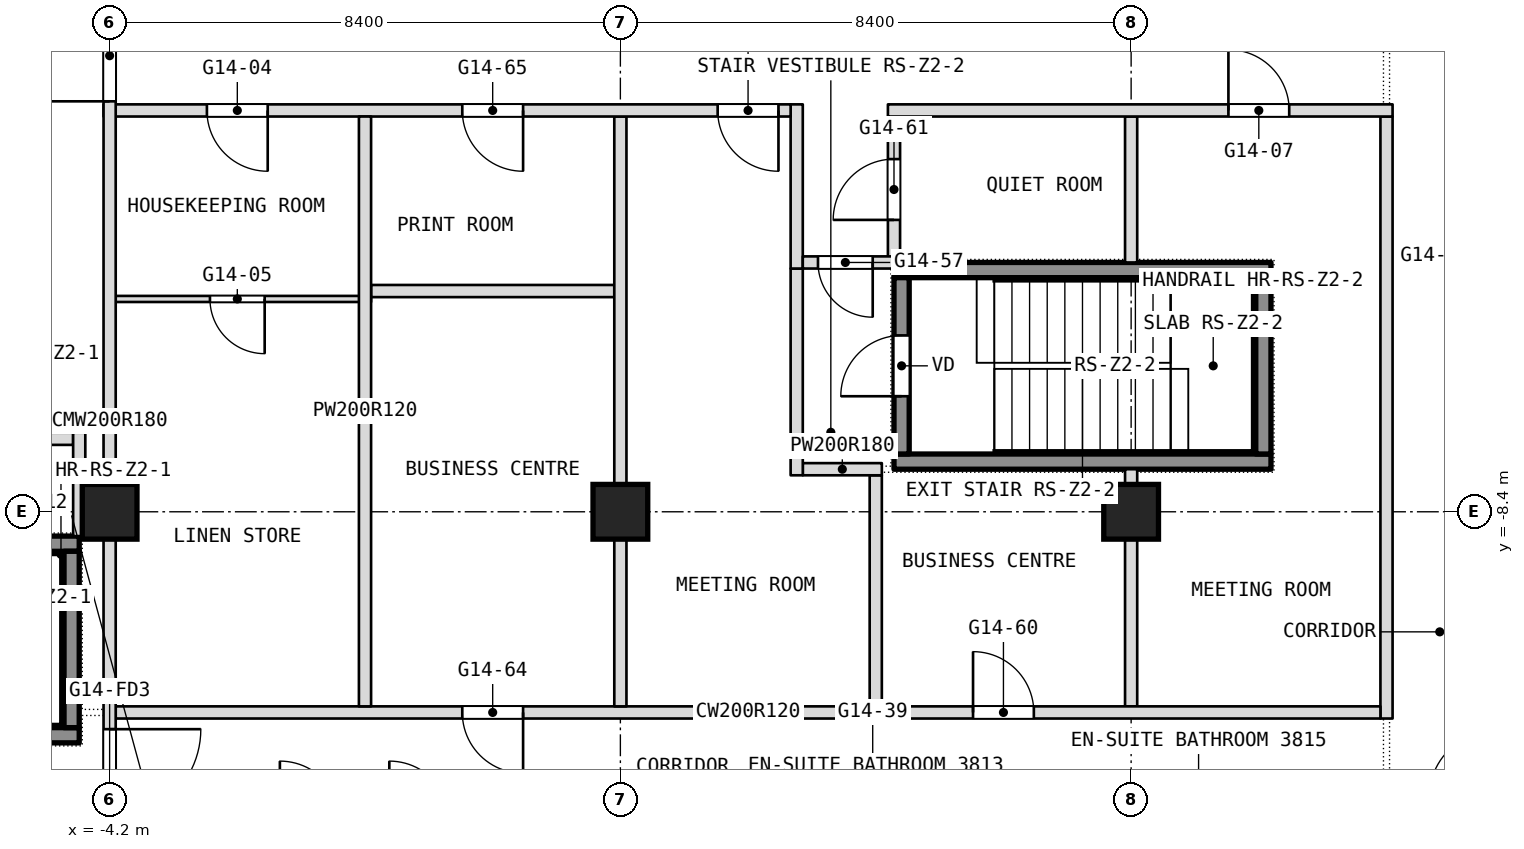
"""IFC4 building model, lengths in metres.
Left out: names, types, materials, properties, quantities, classifications, styles, units other than length and angle.
Written with IfcOpenShell. Run it as: python <this file> out.ifc"""

import sys

from ifc_helpers import new_model, si_unit, direction, frame, frame_2d, origin, origin_2d, place, context, subcontext, project, spatial, rectangle, extrude, element, fill, save


model = new_model("IFC4")
c1 = context("Model", 3, precision=1e-05, world=origin(), true_north=direction((0.0, 1.0)))
c2 = subcontext(c1, "Body", "Model", "MODEL_VIEW")
j1 = project(units=[si_unit("LENGTHUNIT", "METRE"), si_unit("PLANEANGLEUNIT", "RADIAN")], contexts=[c1])
p1 = place(None, origin())
s1 = spatial("IfcSite", under=j1, at=p1, CompositionType="ELEMENT")
p2 = place(p1, origin())
s2 = spatial("IfcBuilding", under=s1, at=p2, CompositionType="ELEMENT")
p3 = place(p2, frame((0.0, 0.0, 162.5)))
s3 = spatial("IfcBuildingStorey", under=s2, at=p3, CompositionType="ELEMENT", Elevation=162.5)
for number, where, z_axis, x_axis in (
    (1, (-4.2, -8.4, 0.0), (0.0, 0.0, 1.0), (1.0, 0.0, 0.0)),
    (2, (4.2, -8.4, 0.0), (0.0, 0.0, 1.0), (1.0, 0.0, 0.0)),
    (3, (12.6, -8.4, 0.0), (0.0, 0.0, 1.0), (1.0, 0.0, 0.0)),
):
    element("IfcColumn", number, at=place(p3, frame(where, z_axis=z_axis, x_axis=x_axis)), inside=s3, PredefinedType="COLUMN", context=c2, shape_type="SweptSolid", body=[
        extrude(rectangle(XDim=0.9, YDim=0.9, at=origin_2d()), origin(), (0.0, 0.0, 1.0), 3.6),
    ])
p4 = place(p3, frame((16.8, -11.8, 0.0), z_axis=(0.0, 0.0, 1.0), x_axis=(0.0, 1.0, 0.0)))
e4 = element("IfcWall", 4, at=p4, inside=s3, PredefinedType="PARTITIONING", context=c2, shape_type="SweptSolid", body=[
    extrude(rectangle(XDim=9.9, YDim=0.2, at=frame_2d((4.95, 0.0))), origin(), (0.0, 0.0, 1.0), 3.34),
])
p5 = place(p3, frame((12.6, -11.6, 0.0), z_axis=(0.0, 0.0, 1.0), x_axis=(0.0, 1.0, 0.0)))
e5 = element("IfcWall", 5, at=p5, inside=s3, PredefinedType="PARTITIONING", context=c2, shape_type="SweptSolid", body=[
    extrude(rectangle(XDim=3.9, YDim=0.2, at=frame_2d((1.95, 0.0))), origin(), (0.0, 0.0, 1.0), 3.34),
])
p6 = place(p3, frame((12.6, -4.3, 0.0), z_axis=(0.0, 0.0, 1.0), x_axis=(0.0, 1.0, 0.0)))
e6 = element("IfcWall", 6, at=p6, inside=s3, PredefinedType="PARTITIONING", context=c2, shape_type="SweptSolid", body=[
    extrude(rectangle(XDim=2.4, YDim=0.2, at=frame_2d((1.2, 0.0))), origin(), (0.0, 0.0, 1.0), 3.34),
])
p7 = place(p3, frame((-4.1, -11.7, 0.0), z_axis=(0.0, 0.0, 1.0), x_axis=(1.0, 0.0, 0.0)))
e7 = element("IfcWall", 7, at=p7, inside=s3, PredefinedType="PARTITIONING", context=c2, shape_type="SweptSolid", body=[
    extrude(rectangle(XDim=20.8, YDim=0.2, at=frame_2d((10.4, 0.0))), origin(), (0.0, 0.0, 1.0), 3.34),
])
p8 = place(p7, frame((14.1, 0.0, 0.0)))
e8 = element("IfcOpeningElement", 8, at=p8, cuts=e7, PredefinedType="OPENING", context=c2, shape_type="SweptSolid", body=[
    extrude(rectangle(XDim=1.0, YDim=2.1, at=frame_2d((0.5, 1.05))), frame((0.0, 0.1, 0.0), z_axis=(0.0, -1.0, 0.0), x_axis=(1.0, 0.0, 0.0)), (0.0, 0.0, 1.0), 0.2),
])
p9 = place(p7, frame((5.7, 0.0, 0.0)))
e9 = element("IfcOpeningElement", 9, at=p9, cuts=e7, PredefinedType="OPENING", context=c2, shape_type="SweptSolid", body=[
    extrude(rectangle(XDim=1.0, YDim=2.1, at=frame_2d((0.5, 1.05))), frame((0.0, 0.1, 0.0), z_axis=(0.0, -1.0, 0.0), x_axis=(1.0, 0.0, 0.0)), (0.0, 0.0, 1.0), 0.2),
])
p10 = place(p3, frame((8.7, -4.3, 0.0), z_axis=(0.0, 0.0, 1.0), x_axis=(0.0, 1.0, 0.0)))
e10 = element("IfcWall", 10, at=p10, inside=s3, PredefinedType="PARTITIONING", context=c2, shape_type="SweptSolid", body=[
    extrude(rectangle(XDim=2.4, YDim=0.2, at=frame_2d((1.2, 0.0))), origin(), (0.0, 0.0, 1.0), 3.34),
])
p11 = place(p10, frame((0.7, 0.0, 0.0)))
e11 = element("IfcOpeningElement", 11, at=p11, cuts=e10, PredefinedType="OPENING", context=c2, shape_type="SweptSolid", body=[
    extrude(rectangle(XDim=1.0, YDim=2.1, at=frame_2d((0.5, 1.05))), frame((0.0, 0.1, 0.0), z_axis=(0.0, -1.0, 0.0), x_axis=(1.0, 0.0, 0.0)), (0.0, 0.0, 1.0), 0.2),
])
p12 = place(p3, frame((8.4, -11.6, 0.0), z_axis=(0.0, 0.0, 1.0), x_axis=(0.0, 1.0, 0.0)))
e12 = element("IfcWall", 12, at=p12, inside=s3, PredefinedType="PARTITIONING", context=c2, shape_type="SweptSolid", body=[
    extrude(rectangle(XDim=3.8, YDim=0.2, at=frame_2d((1.9, 0.0))), origin(), (0.0, 0.0, 1.0), 3.34),
])
p13 = place(p3, frame((7.2, -7.7, 0.0), z_axis=(0.0, 0.0, 1.0), x_axis=(1.0, 0.0, 0.0)))
e13 = element("IfcWall", 13, at=p13, inside=s3, PredefinedType="PARTITIONING", context=c2, shape_type="SweptSolid", body=[
    extrude(rectangle(XDim=1.3, YDim=0.2, at=frame_2d((0.65, 0.0))), origin(), (0.0, 0.0, 1.0), 3.34),
])
p14 = place(p3, frame((-8.5, -7.2, 0.0), z_axis=(0.0, 0.0, 1.0), x_axis=(1.0, 0.0, 0.0)))
e14 = element("IfcWall", 14, at=p14, inside=s3, PredefinedType="PARTITIONING", context=c2, shape_type="SweptSolid", body=[
    extrude(rectangle(XDim=3.7, YDim=0.2, at=frame_2d((1.85, 0.0))), origin(), (0.0, 0.0, 1.0), 3.34),
])
p15 = place(p14, frame((0.25, 0.0, 0.0)))
e15 = element("IfcOpeningElement", 15, at=p15, cuts=e14, PredefinedType="OPENING", context=c2, shape_type="SweptSolid", body=[
    extrude(rectangle(XDim=0.9, YDim=2.1, at=frame_2d((0.45, 1.05))), frame((0.0, 0.1, 0.0), z_axis=(0.0, -1.0, 0.0), x_axis=(1.0, 0.0, 0.0)), (0.0, 0.0, 1.0), 0.2),
])
p16 = place(p3, frame((7.1, -7.8, 0.0), z_axis=(0.0, 0.0, 1.0), x_axis=(0.0, 1.0, 0.0)))
e16 = element("IfcWall", 16, at=p16, inside=s3, PredefinedType="PARTITIONING", context=c2, shape_type="SweptSolid", body=[
    extrude(rectangle(XDim=3.4, YDim=0.2, at=frame_2d((1.7, 0.0))), origin(), (0.0, 0.0, 1.0), 3.34),
])
p17 = place(p3, frame((7.1, -4.4, 0.0), z_axis=(0.0, 0.0, 1.0), x_axis=(0.0, 1.0, 0.0)))
e17 = element("IfcWall", 17, at=p17, inside=s3, PredefinedType="PARTITIONING", context=c2, shape_type="SweptSolid", body=[
    extrude(rectangle(XDim=2.7, YDim=0.2, at=frame_2d((1.35, 0.0))), origin(), (0.0, 0.0, 1.0), 3.34),
])
p18 = place(p3, frame((-4.1, -4.9, 0.0), z_axis=(0.0, 0.0, 1.0), x_axis=(1.0, 0.0, 0.0)))
e18 = element("IfcWall", 18, at=p18, inside=s3, PredefinedType="PARTITIONING", context=c2, shape_type="SweptSolid", body=[
    extrude(rectangle(XDim=4.2, YDim=0.1, at=frame_2d((2.1, 0.0))), origin(), (0.0, 0.0, 1.0), 3.34),
])
p19 = place(p18, frame((1.55, 0.0, 0.0)))
e19 = element("IfcOpeningElement", 19, at=p19, cuts=e18, PredefinedType="OPENING", context=c2, shape_type="SweptSolid", body=[
    extrude(rectangle(XDim=0.9, YDim=2.1, at=frame_2d((0.45, 1.05))), frame((0.0, 0.05, 0.0), z_axis=(0.0, -1.0, 0.0), x_axis=(1.0, 0.0, 0.0)), (0.0, 0.0, 1.0), 0.1),
])
p20 = place(p3, frame((0.1, -4.77, 0.0), z_axis=(0.0, 0.0, 1.0), x_axis=(1.0, 0.0, 0.0)))
e20 = element("IfcWall", 20, at=p20, inside=s3, PredefinedType="PARTITIONING", context=c2, shape_type="SweptSolid", body=[
    extrude(rectangle(XDim=4.0, YDim=0.2, at=frame_2d((2.0, 0.0))), origin(), (0.0, 0.0, 1.0), 3.34),
])
p21 = place(p3, frame((7.2, -4.3, 0.0), z_axis=(0.0, 0.0, 1.0), x_axis=(1.0, 0.0, 0.0)))
e21 = element("IfcWall", 21, at=p21, inside=s3, PredefinedType="PARTITIONING", context=c2, shape_type="SweptSolid", body=[
    extrude(rectangle(XDim=1.5, YDim=0.2, at=frame_2d((0.75, 0.0))), origin(), (0.0, 0.0, 1.0), 3.34),
])
p22 = place(p21, frame((0.25, 0.0, 0.0)))
e22 = element("IfcOpeningElement", 22, at=p22, cuts=e21, PredefinedType="OPENING", context=c2, shape_type="SweptSolid", body=[
    extrude(rectangle(XDim=0.9, YDim=2.1, at=frame_2d((0.45, 1.05))), frame((0.0, 0.1, 0.0), z_axis=(0.0, -1.0, 0.0), x_axis=(1.0, 0.0, 0.0)), (0.0, 0.0, 1.0), 0.2),
])
p23 = place(p3, frame((4.2, -11.6, 0.0), z_axis=(0.0, 0.0, 1.0), x_axis=(0.0, 1.0, 0.0)))
e23 = element("IfcWall", 23, at=p23, inside=s3, PredefinedType="PARTITIONING", context=c2, shape_type="SweptSolid", body=[
    extrude(rectangle(XDim=9.7, YDim=0.2, at=frame_2d((4.85, 0.0))), origin(), (0.0, 0.0, 1.0), 3.34),
])
p24 = place(p3, frame((-4.3, -1.8, 0.0), z_axis=(0.0, 0.0, 1.0), x_axis=(1.0, 0.0, 0.0)))
e24 = element("IfcWall", 24, at=p24, inside=s3, PredefinedType="PARTITIONING", context=c2, shape_type="SweptSolid", body=[
    extrude(rectangle(XDim=11.3, YDim=0.2, at=frame_2d((5.65, 0.0))), origin(), (0.0, 0.0, 1.0), 3.34),
])
p25 = place(p24, frame((1.7, 0.0, 0.0)))
e25 = element("IfcOpeningElement", 25, at=p25, cuts=e24, PredefinedType="OPENING", context=c2, shape_type="SweptSolid", body=[
    extrude(rectangle(XDim=1.0, YDim=2.1, at=frame_2d((0.5, 1.05))), frame((0.0, 0.1, 0.0), z_axis=(0.0, -1.0, 0.0), x_axis=(1.0, 0.0, 0.0)), (0.0, 0.0, 1.0), 0.2),
])
p26 = place(p24, frame((10.1, 0.0, 0.0)))
e26 = element("IfcOpeningElement", 26, at=p26, cuts=e24, PredefinedType="OPENING", context=c2, shape_type="SweptSolid", body=[
    extrude(rectangle(XDim=1.0, YDim=2.1, at=frame_2d((0.5, 1.05))), frame((0.0, 0.1, 0.0), z_axis=(0.0, -1.0, 0.0), x_axis=(1.0, 0.0, 0.0)), (0.0, 0.0, 1.0), 0.2),
])
p27 = place(p24, frame((5.9, 0.0, 0.0)))
e27 = element("IfcOpeningElement", 27, at=p27, cuts=e24, PredefinedType="OPENING", context=c2, shape_type="SweptSolid", body=[
    extrude(rectangle(XDim=1.0, YDim=2.1, at=frame_2d((0.5, 1.05))), frame((0.0, 0.1, 0.0), z_axis=(0.0, -1.0, 0.0), x_axis=(1.0, 0.0, 0.0)), (0.0, 0.0, 1.0), 0.2),
])
p28 = place(p3, frame((8.6, -1.8, 0.0), z_axis=(0.0, 0.0, 1.0), x_axis=(1.0, 0.0, 0.0)))
e28 = element("IfcWall", 28, at=p28, inside=s3, PredefinedType="PARTITIONING", context=c2, shape_type="SweptSolid", body=[
    extrude(rectangle(XDim=8.3, YDim=0.2, at=frame_2d((4.15, 0.0))), origin(), (0.0, 0.0, 1.0), 3.34),
])
p29 = place(p28, frame((5.6, 0.0, 0.0)))
e29 = element("IfcOpeningElement", 29, at=p29, cuts=e28, PredefinedType="OPENING", context=c2, shape_type="SweptSolid", body=[
    extrude(rectangle(XDim=1.0, YDim=2.1, at=frame_2d((0.5, 1.05))), frame((0.0, 0.1, 0.0), z_axis=(0.0, -1.0, 0.0), x_axis=(1.0, 0.0, 0.0)), (0.0, 0.0, 1.0), 0.2),
])
p30 = place(p3, frame((0.0, -11.6, 0.0), z_axis=(0.0, 0.0, 1.0), x_axis=(0.0, 1.0, 0.0)))
e30 = element("IfcWall", 30, at=p30, inside=s3, PredefinedType="PARTITIONING", context=c2, shape_type="SweptSolid", body=[
    extrude(rectangle(XDim=9.7, YDim=0.2, at=frame_2d((4.85, 0.0))), origin(), (0.0, 0.0, 1.0), 3.34),
])
p31 = place(p3, frame((-4.2, -13.8, 0.0), z_axis=(0.0, 0.0, 1.0), x_axis=(0.0, 1.0, 0.0)))
e31 = element("IfcWall", 31, at=p31, inside=s3, PredefinedType="PARTITIONING", context=c2, shape_type="SweptSolid", body=[
    extrude(rectangle(XDim=13.8, YDim=0.2, at=frame_2d((6.9, 0.0))), origin(), (0.0, 0.0, 1.0), 3.34),
])
p32 = place(p31, frame((12.15, 0.0, 0.0)))
e32 = element("IfcOpeningElement", 32, at=p32, cuts=e31, PredefinedType="OPENING", context=c2, shape_type="SweptSolid", body=[
    extrude(rectangle(XDim=1.5, YDim=2.1, at=frame_2d((0.75, 1.05))), frame((0.0, 0.1, 0.0), z_axis=(0.0, -1.0, 0.0), x_axis=(1.0, 0.0, 0.0)), (0.0, 0.0, 1.0), 0.2),
])
p33 = place(p31, frame((0.325, 0.0, 0.0)))
e33 = element("IfcOpeningElement", 33, at=p33, cuts=e31, PredefinedType="OPENING", context=c2, shape_type="SweptSolid", body=[
    extrude(rectangle(XDim=1.5, YDim=2.1, at=frame_2d((0.75, 1.05))), frame((0.0, 0.1, 0.0), z_axis=(0.0, -1.0, 0.0), x_axis=(1.0, 0.0, 0.0)), (0.0, 0.0, 1.0), 0.2),
])
p34 = place(p3, frame((-4.7, -8.8, 0.0), z_axis=(0.0, 0.0, 1.0), x_axis=(0.0, 1.0, 0.0)))
e34 = element("IfcWall", 34, at=p34, inside=s3, PredefinedType="PARTITIONING", context=c2, shape_type="SweptSolid", body=[
    extrude(rectangle(XDim=1.7, YDim=0.2, at=frame_2d((0.85, 0.0))), origin(), (0.0, 0.0, 1.0), 3.34),
])
p35 = place(p3, frame((-10.9, -12.075, 0.1), z_axis=(0.0, 0.0, 1.0), x_axis=(1.0, 0.0, 0.0)))
e35 = element("IfcWall", 35, at=p35, inside=s3, PredefinedType="SHEAR", context=c2, shape_type="SweptSolid", body=[
    extrude(rectangle(XDim=6.2, YDim=0.25, at=frame_2d((3.1, 0.0))), origin(), (0.0, 0.0, 1.0), 3.6),
])
p36 = place(p3, frame((-10.9, -8.925, 0.1), z_axis=(0.0, 0.0, 1.0), x_axis=(1.0, 0.0, 0.0)))
e36 = element("IfcWall", 36, at=p36, inside=s3, PredefinedType="SHEAR", context=c2, shape_type="SweptSolid", body=[
    extrude(rectangle(XDim=6.2, YDim=0.25, at=frame_2d((3.1, 0.0))), origin(), (0.0, 0.0, 1.0), 3.6),
])
p37 = place(p36, frame((0.45, 0.0, 0.0)))
e37 = element("IfcOpeningElement", 37, at=p37, cuts=e36, PredefinedType="OPENING", context=c2, shape_type="SweptSolid", body=[
    extrude(rectangle(XDim=1.0, YDim=2.1, at=frame_2d((0.5, 1.05))), frame((0.0, 0.125, 0.0), z_axis=(0.0, -1.0, 0.0), x_axis=(1.0, 0.0, 0.0)), (0.0, 0.0, 1.0), 0.25),
])
p38 = place(p3, frame((-4.825, -11.95, 0.1), z_axis=(0.0, 0.0, 1.0), x_axis=(0.0, 1.0, 0.0)))
e38 = element("IfcWall", 38, at=p38, inside=s3, PredefinedType="SHEAR", context=c2, shape_type="SweptSolid", body=[
    extrude(rectangle(XDim=2.9, YDim=0.25, at=frame_2d((1.45, 0.0))), origin(), (0.0, 0.0, 1.0), 3.6),
])
for number, where, z_axis, x_axis in (
    (39, (8.7, -7.575, 0.1), (0.0, 0.0, 1.0), (1.0, 0.0, 0.0)),
    (40, (8.7, -4.425, 0.1), (0.0, 0.0, 1.0), (1.0, 0.0, 0.0)),
):
    element("IfcWall", number, at=place(p3, frame(where, z_axis=z_axis, x_axis=x_axis)), inside=s3, PredefinedType="SHEAR", context=c2, shape_type="SweptSolid", body=[
        extrude(rectangle(XDim=6.2, YDim=0.25, at=frame_2d((3.1, 0.0))), origin(), (0.0, 0.0, 1.0), 3.6),
    ])
p39 = place(p3, frame((8.825, -7.45, 0.1), z_axis=(0.0, 0.0, 1.0), x_axis=(0.0, 1.0, 0.0)))
e41 = element("IfcWall", 41, at=p39, inside=s3, PredefinedType="SHEAR", context=c2, shape_type="SweptSolid", body=[
    extrude(rectangle(XDim=2.9, YDim=0.25, at=frame_2d((1.45, 0.0))), origin(), (0.0, 0.0, 1.0), 3.6),
])
p40 = place(p39, frame((0.95, 0.0, 0.0)))
e42 = element("IfcOpeningElement", 42, at=p40, cuts=e41, PredefinedType="OPENING", context=c2, shape_type="SweptSolid", body=[
    extrude(rectangle(XDim=1.0, YDim=2.1, at=frame_2d((0.5, 1.05))), frame((0.0, 0.125, 0.0), z_axis=(0.0, -1.0, 0.0), x_axis=(1.0, 0.0, 0.0)), (0.0, 0.0, 1.0), 0.25),
])
p41 = place(p3, frame((14.775, -7.45, 0.1), z_axis=(0.0, 0.0, 1.0), x_axis=(0.0, 1.0, 0.0)))
e43 = element("IfcWall", 43, at=p41, inside=s3, PredefinedType="SHEAR", context=c2, shape_type="SweptSolid", body=[
    extrude(rectangle(XDim=2.9, YDim=0.25, at=frame_2d((1.45, 0.0))), origin(), (0.0, 0.0, 1.0), 3.6),
])
p42 = place(p8, origin())
e44 = element("IfcDoor", 44, at=p42, inside=s3, OperationType="SINGLE_SWING_RIGHT", PredefinedType="DOOR", context=c2, shape_type="SweptSolid", body=[
    extrude(rectangle(XDim=1.0, YDim=2.1, at=frame_2d((0.5, 1.05))), frame((0.0, 0.025, 0.0), z_axis=(0.0, -1.0, 0.0), x_axis=(1.0, 0.0, 0.0)), (0.0, 0.0, 1.0), 0.05),
])
fill(e8, e44)
p43 = place(p9, origin())
e45 = element("IfcDoor", 45, at=p43, inside=s3, OperationType="SINGLE_SWING_RIGHT", PredefinedType="DOOR", context=c2, shape_type="SweptSolid", body=[
    extrude(rectangle(XDim=1.0, YDim=2.1, at=frame_2d((0.5, 1.05))), frame((0.0, 0.025, 0.0), z_axis=(0.0, -1.0, 0.0), x_axis=(1.0, 0.0, 0.0)), (0.0, 0.0, 1.0), 0.05),
])
fill(e9, e45)
p44 = place(p11, origin())
e46 = element("IfcDoor", 46, at=p44, inside=s3, OperationType="SINGLE_SWING_LEFT", PredefinedType="DOOR", context=c2, shape_type="SweptSolid", body=[
    extrude(rectangle(XDim=1.0, YDim=2.1, at=frame_2d((0.5, 1.05))), frame((0.0, 0.025, 0.0), z_axis=(0.0, -1.0, 0.0), x_axis=(1.0, 0.0, 0.0)), (0.0, 0.0, 1.0), 0.05),
])
fill(e11, e46)
p45 = place(p19, origin())
e47 = element("IfcDoor", 47, at=p45, inside=s3, OperationType="SINGLE_SWING_LEFT", PredefinedType="DOOR", context=c2, shape_type="SweptSolid", body=[
    extrude(rectangle(XDim=0.9, YDim=2.1, at=frame_2d((0.45, 1.05))), frame((0.0, 0.025, 0.0), z_axis=(0.0, -1.0, 0.0), x_axis=(1.0, 0.0, 0.0)), (0.0, 0.0, 1.0), 0.05),
])
fill(e19, e47)
p46 = place(p22, origin())
e48 = element("IfcDoor", 48, at=p46, inside=s3, OperationType="SINGLE_SWING_LEFT", PredefinedType="DOOR", context=c2, shape_type="SweptSolid", body=[
    extrude(rectangle(XDim=0.9, YDim=2.1, at=frame_2d((0.45, 1.05))), frame((0.0, 0.025, 0.0), z_axis=(0.0, -1.0, 0.0), x_axis=(1.0, 0.0, 0.0)), (0.0, 0.0, 1.0), 0.05),
])
fill(e22, e48)
p47 = place(p25, origin())
e49 = element("IfcDoor", 49, at=p47, inside=s3, OperationType="SINGLE_SWING_RIGHT", PredefinedType="DOOR", context=c2, shape_type="SweptSolid", body=[
    extrude(rectangle(XDim=1.0, YDim=2.1, at=frame_2d((0.5, 1.05))), frame((0.0, 0.025, 0.0), z_axis=(0.0, -1.0, 0.0), x_axis=(1.0, 0.0, 0.0)), (0.0, 0.0, 1.0), 0.05),
])
fill(e25, e49)
p48 = place(p26, origin())
e50 = element("IfcDoor", 50, at=p48, inside=s3, OperationType="SINGLE_SWING_LEFT", PredefinedType="DOOR", context=c2, shape_type="SweptSolid", body=[
    extrude(rectangle(XDim=1.0, YDim=2.1, at=frame_2d((0.5, 1.05))), frame((0.0, 0.025, 0.0), z_axis=(0.0, -1.0, 0.0), x_axis=(1.0, 0.0, 0.0)), (0.0, 0.0, 1.0), 0.05),
])
fill(e26, e50)
p49 = place(p27, origin())
e51 = element("IfcDoor", 51, at=p49, inside=s3, OperationType="SINGLE_SWING_LEFT", PredefinedType="DOOR", context=c2, shape_type="SweptSolid", body=[
    extrude(rectangle(XDim=1.0, YDim=2.1, at=frame_2d((0.5, 1.05))), frame((0.0, 0.025, 0.0), z_axis=(0.0, -1.0, 0.0), x_axis=(1.0, 0.0, 0.0)), (0.0, 0.0, 1.0), 0.05),
])
fill(e27, e51)
p50 = place(p29, origin())
e52 = element("IfcDoor", 52, at=p50, inside=s3, OperationType="SINGLE_SWING_LEFT", PredefinedType="DOOR", context=c2, shape_type="SweptSolid", body=[
    extrude(rectangle(XDim=1.0, YDim=2.1, at=frame_2d((0.5, 1.05))), frame((0.0, 0.025, 0.0), z_axis=(0.0, -1.0, 0.0), x_axis=(1.0, 0.0, 0.0)), (0.0, 0.0, 1.0), 0.05),
])
fill(e29, e52)
p51 = place(p40, origin())
e53 = element("IfcDoor", 53, at=p51, inside=s3, OperationType="SINGLE_SWING_LEFT", PredefinedType="DOOR", context=c2, shape_type="SweptSolid", body=[
    extrude(rectangle(XDim=1.0, YDim=2.1, at=frame_2d((0.5, 1.05))), frame((0.0, 0.025, 0.0), z_axis=(0.0, -1.0, 0.0), x_axis=(1.0, 0.0, 0.0)), (0.0, 0.0, 1.0), 0.05),
])
fill(e42, e53)
p52 = place(p32, origin())
e54 = element("IfcDoor", 54, at=p52, inside=s3, OperationType="DOUBLE_DOOR_DOUBLE_SWING", PredefinedType="DOOR", context=c2, shape_type="SweptSolid", body=[
    extrude(rectangle(XDim=1.5, YDim=2.1, at=frame_2d((0.75, 1.05))), frame((0.0, 0.025, 0.0), z_axis=(0.0, -1.0, 0.0), x_axis=(1.0, 0.0, 0.0)), (0.0, 0.0, 1.0), 0.05),
])
fill(e32, e54)
p53 = place(p33, origin())
e55 = element("IfcDoor", 55, at=p53, inside=s3, OperationType="DOUBLE_DOOR_DOUBLE_SWING", PredefinedType="DOOR", context=c2, shape_type="SweptSolid", body=[
    extrude(rectangle(XDim=1.5, YDim=2.1, at=frame_2d((0.75, 1.05))), frame((0.0, 0.025, 0.0), z_axis=(0.0, -1.0, 0.0), x_axis=(1.0, 0.0, 0.0)), (0.0, 0.0, 1.0), 0.05),
])
fill(e33, e55)
save(model, sys.argv[1])
